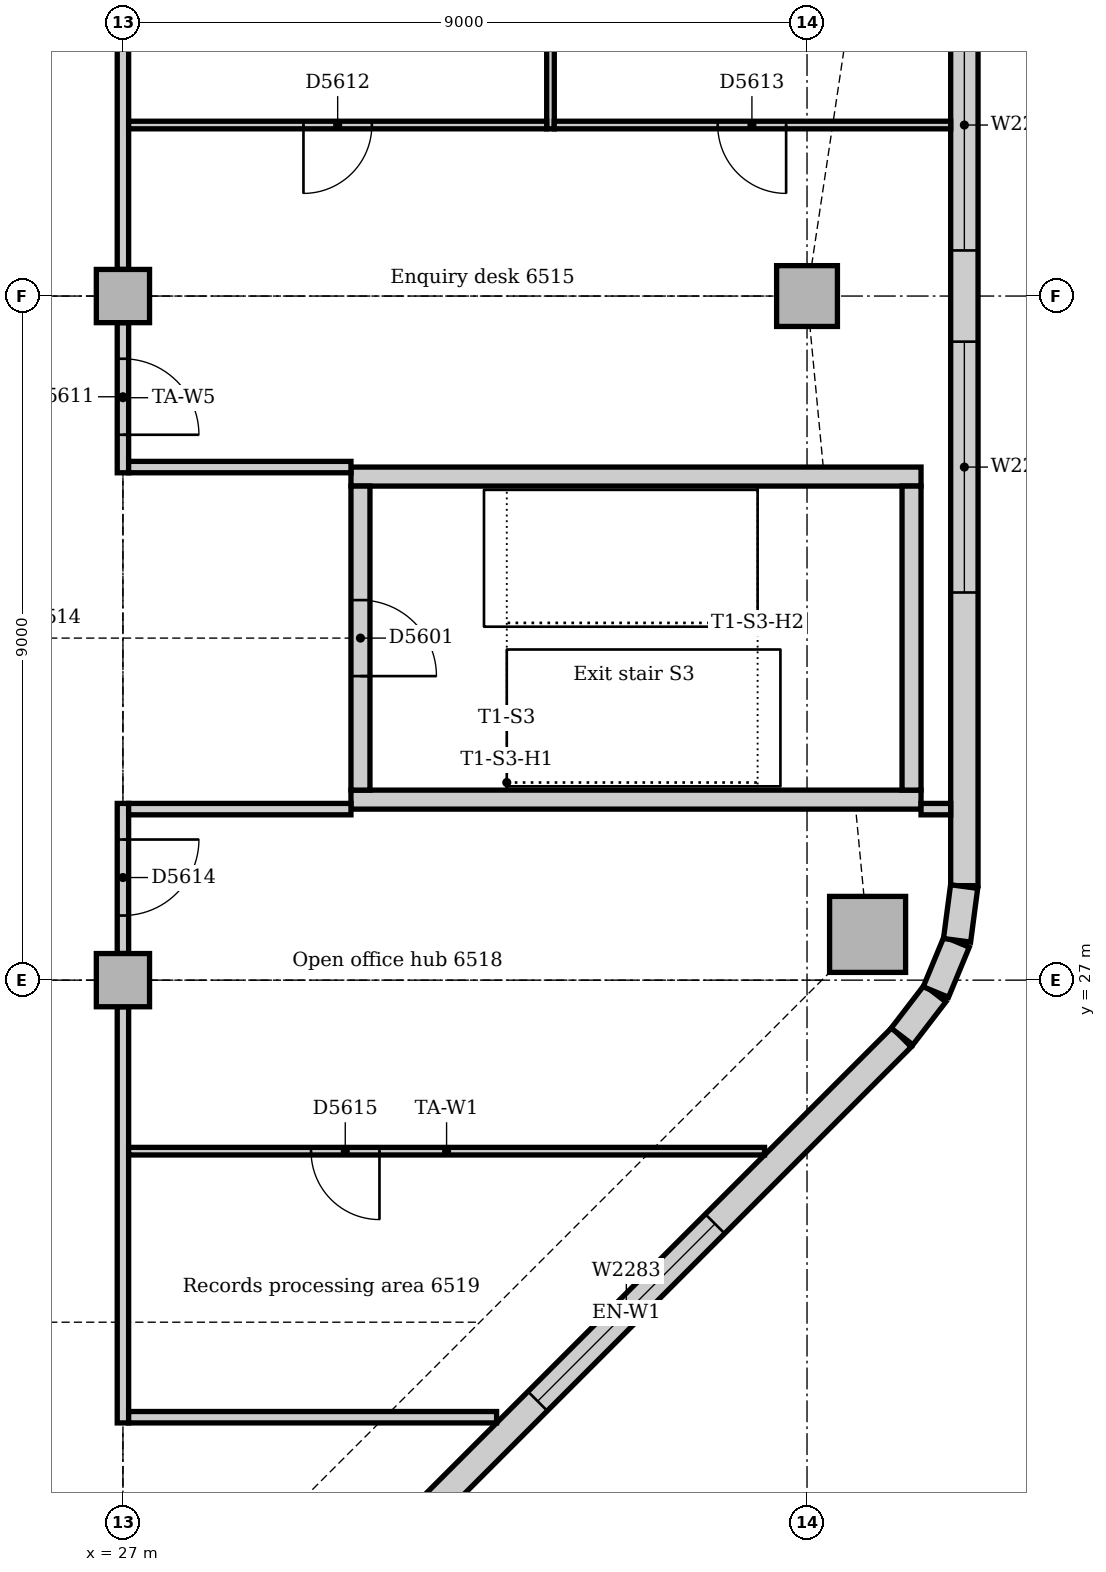
"""IFC4 building model, lengths in metres.
Left out: names, types, materials, properties, quantities, classifications, styles, units other than length and angle.
Written with IfcOpenShell. Run it as: python <this file> out.ifc"""

import sys

from ifc_helpers import new_model, si_unit, direction, frame, frame_2d, origin, origin_2d, place, context, subcontext, project, spatial, rectangle, extrude, element, fill, save


model = new_model("IFC4")
c1 = context("Model", 3, precision=1e-05, world=origin(), true_north=direction((0.0, 1.0)))
c2 = subcontext(c1, "Body", "Model", "MODEL_VIEW")
j1 = project(units=[si_unit("LENGTHUNIT", "METRE"), si_unit("PLANEANGLEUNIT", "RADIAN")], contexts=[c1])
p1 = place(None, origin())
s1 = spatial("IfcSite", under=j1, at=p1, CompositionType="ELEMENT")
p2 = place(p1, origin())
s2 = spatial("IfcBuilding", under=s1, at=p2, CompositionType="ELEMENT")
p3 = place(p2, frame((0.0, 0.0, 271.0)))
s3 = spatial("IfcBuildingStorey", under=s2, at=p3, CompositionType="ELEMENT", Elevation=271.0)
for number, where, z_axis, x_axis in (
    (1, (30.0, 29.375, 0.0), (0.0, 0.0, 1.0), (1.0, 0.0, 0.0)),
    (2, (37.5, 33.625, 0.0), (0.0, 0.0, 1.0), (-1.0, 0.0, 0.0)),
):
    element("IfcWall", number, at=place(p3, frame(where, z_axis=z_axis, x_axis=x_axis)), inside=s3, PredefinedType="SOLIDWALL", context=c2, shape_type="SweptSolid", body=[
        extrude(rectangle(XDim=7.5, YDim=0.25, at=frame_2d((3.75, 0.0))), origin(), (0.0, 0.0, 1.0), 4.0),
    ])
p4 = place(p3, frame((37.375, 29.5, 0.0), z_axis=(0.0, 0.0, 1.0), x_axis=(0.0, 1.0, 0.0)))
e3 = element("IfcWall", 3, at=p4, inside=s3, PredefinedType="SOLIDWALL", context=c2, shape_type="SweptSolid", body=[
    extrude(rectangle(XDim=4.0, YDim=0.25, at=frame_2d((2.0, 0.0))), origin(), (0.0, 0.0, 1.0), 4.0),
])
p5 = place(p3, frame((30.125, 33.5, 0.0), z_axis=(0.0, 0.0, 1.0), x_axis=(0.0, -1.0, 0.0)))
e4 = element("IfcWall", 4, at=p5, inside=s3, PredefinedType="SOLIDWALL", context=c2, shape_type="SweptSolid", body=[
    extrude(rectangle(XDim=4.0, YDim=0.25, at=frame_2d((2.0, 0.0))), origin(), (0.0, 0.0, 1.0), 4.0),
])
p6 = place(p5, frame((1.5, 0.0, 0.0)))
e5 = element("IfcOpeningElement", 5, at=p6, cuts=e4, PredefinedType="OPENING", context=c2, shape_type="SweptSolid", body=[
    extrude(rectangle(XDim=1.0, YDim=2.1, at=frame_2d((0.5, 1.05))), frame((0.0, 0.135, 0.0), z_axis=(0.0, -1.0, 0.0), x_axis=(1.0, 0.0, 0.0)), (0.0, 0.0, 1.0), 0.27),
])
p7 = place(p3, frame((36.797, 27.602, 0.0), z_axis=(0.0, 0.0, 1.0), x_axis=(1.0, 0.0, 0.0)))
e6 = element("IfcColumn", 6, at=p7, inside=s3, PredefinedType="COLUMN", context=c2, shape_type="SweptSolid", body=[
    extrude(rectangle(XDim=1.0, YDim=1.0, at=origin_2d()), origin(), (0.0, 0.0, 1.0), 3.85),
])
p8 = place(p3, frame((36.0, 36.0, 0.0), z_axis=(0.0, 0.0, 1.0), x_axis=(1.0, 0.0, 0.0)))
e7 = element("IfcColumn", 7, at=p8, inside=s3, PredefinedType="COLUMN", context=c2, shape_type="SweptSolid", body=[
    extrude(rectangle(XDim=0.8, YDim=0.8, at=origin_2d()), origin(), (0.0, 0.0, 1.0), 3.85),
])
for number, where, z_axis, x_axis in (
    (8, (27.0, 27.0, 0.0), (0.0, 0.0, 1.0), (1.0, 0.0, 0.0)),
    (9, (27.0, 36.0, 0.0), (0.0, 0.0, 1.0), (1.0, 0.0, 0.0)),
):
    element("IfcColumn", number, at=place(p3, frame(where, z_axis=z_axis, x_axis=x_axis)), inside=s3, PredefinedType="COLUMN", context=c2, shape_type="SweptSolid", body=[
        extrude(rectangle(XDim=0.7, YDim=0.7, at=origin_2d()), origin(), (0.0, 0.0, 1.0), 3.85),
    ])
p9 = place(p3, frame((30.001, 19.006, 0.0), z_axis=(0.0, 0.0, 1.0), x_axis=(0.707106781187, 0.707106781187, 0.0)))
e10 = element("IfcWall", 10, at=p9, inside=s3, PredefinedType="STANDARD", context=c2, shape_type="SweptSolid", body=[
    extrude(rectangle(XDim=10.243, YDim=0.36, at=frame_2d((5.121, 0.0))), origin(), (0.0, 0.0, 1.0), 3.85),
])
p10 = place(p9, frame((3.471, 0.0, 0.9)))
e11 = element("IfcOpeningElement", 11, at=p10, cuts=e10, PredefinedType="OPENING", context=c2, shape_type="SweptSolid", body=[
    extrude(rectangle(XDim=3.3, YDim=1.6, at=frame_2d((1.65, 0.8))), frame((0.0, 0.19, 0.0), z_axis=(0.0, -1.0, 0.0), x_axis=(1.0, 0.0, 0.0)), (0.0, 0.0, 1.0), 0.38),
])
p11 = place(p3, frame((38.07, 28.243, 0.0), z_axis=(0.0, 0.0, 1.0), x_axis=(0.0, 1.0, 0.0)))
e12 = element("IfcWall", 12, at=p11, inside=s3, PredefinedType="STANDARD", context=c2, shape_type="SweptSolid", body=[
    extrude(rectangle(XDim=24.515, YDim=0.36, at=frame_2d((12.257, 0.0))), origin(), (0.0, 0.0, 1.0), 3.85),
])
p12 = place(p11, frame((3.857, 0.0, 0.9)))
e13 = element("IfcOpeningElement", 13, at=p12, cuts=e12, PredefinedType="OPENING", context=c2, shape_type="SweptSolid", body=[
    extrude(rectangle(XDim=3.3, YDim=1.6, at=frame_2d((1.65, 0.8))), frame((0.0, 0.19, 0.0), z_axis=(0.0, -1.0, 0.0), x_axis=(1.0, 0.0, 0.0)), (0.0, 0.0, 1.0), 0.38),
])
p13 = place(p11, frame((8.357, 0.0, 0.9)))
e14 = element("IfcOpeningElement", 14, at=p13, cuts=e12, PredefinedType="OPENING", context=c2, shape_type="SweptSolid", body=[
    extrude(rectangle(XDim=3.3, YDim=1.6, at=frame_2d((1.65, 0.8))), frame((0.0, 0.19, 0.0), z_axis=(0.0, -1.0, 0.0), x_axis=(1.0, 0.0, 0.0)), (0.0, 0.0, 1.0), 0.38),
])
p14 = place(p11, frame((12.857, 0.0, 0.9)))
e15 = element("IfcOpeningElement", 15, at=p14, cuts=e12, PredefinedType="OPENING", context=c2, shape_type="SweptSolid", body=[
    extrude(rectangle(XDim=3.3, YDim=1.6, at=frame_2d((1.65, 0.8))), frame((0.0, 0.19, 0.0), z_axis=(0.0, -1.0, 0.0), x_axis=(1.0, 0.0, 0.0)), (0.0, 0.0, 1.0), 0.38),
])
p15 = place(p11, frame((17.357, 0.0, 0.9)))
e16 = element("IfcOpeningElement", 16, at=p15, cuts=e12, PredefinedType="OPENING", context=c2, shape_type="SweptSolid", body=[
    extrude(rectangle(XDim=3.3, YDim=1.6, at=frame_2d((1.65, 0.8))), frame((0.0, 0.19, 0.0), z_axis=(0.0, -1.0, 0.0), x_axis=(1.0, 0.0, 0.0)), (0.0, 0.0, 1.0), 0.38),
])
p16 = place(p3, frame((37.25, 26.259, 0.0), z_axis=(0.0, 0.0, 1.0), x_axis=(0.608802368033, 0.793321924995, 0.0)))
e17 = element("IfcWall", 17, at=p16, inside=s3, PredefinedType="STANDARD", context=c2, shape_type="SweptSolid", body=[
    extrude(rectangle(XDim=0.713, YDim=0.36, at=frame_2d((0.357, 0.0))), origin(), (0.0, 0.0, 1.0), 3.85),
])
for number, where, z_axis, x_axis in (
    (18, (37.695, 26.844, 0.0), (0.0, 0.0, 1.0), (0.383, 0.924, 0.0)),
    (19, (37.974, 27.524, 0.0), (0.0, 0.0, 1.0), (0.131, 0.991, 0.0)),
):
    element("IfcWall", number, at=place(p3, frame(where, z_axis=z_axis, x_axis=x_axis)), inside=s3, PredefinedType="STANDARD", context=c2, shape_type="SweptSolid", body=[
        extrude(rectangle(XDim=0.713, YDim=0.36, at=frame_2d((0.356, 0.0))), origin(), (0.0, 0.0, 1.0), 3.85),
    ])
p17 = place(p3, frame((27.0, 33.675, 0.0), z_axis=(0.0, 0.0, 1.0), x_axis=(0.0, 1.0, 0.0)))
e20 = element("IfcWall", 20, at=p17, inside=s3, PredefinedType="PARTITIONING", context=c2, shape_type="SweptSolid", body=[
    extrude(rectangle(XDim=1.975, YDim=0.15, at=frame_2d((0.988, 0.0))), origin(), (0.0, 0.0, 1.0), 3.4),
])
p18 = place(p17, frame((0.5, 0.0, 0.0)))
e21 = element("IfcOpeningElement", 21, at=p18, cuts=e20, PredefinedType="OPENING", context=c2, shape_type="SweptSolid", body=[
    extrude(rectangle(XDim=1.0, YDim=2.1, at=frame_2d((0.5, 1.05))), frame((0.0, 0.085, 0.0), z_axis=(0.0, -1.0, 0.0), x_axis=(1.0, 0.0, 0.0)), (0.0, 0.0, 1.0), 0.17),
])
p19 = place(p3, frame((27.0, 36.35, 0.0), z_axis=(0.0, 0.0, 1.0), x_axis=(0.0, 1.0, 0.0)))
e22 = element("IfcWall", 22, at=p19, inside=s3, PredefinedType="PARTITIONING", context=c2, shape_type="SweptSolid", body=[
    extrude(rectangle(XDim=7.4, YDim=0.15, at=frame_2d((3.7, 0.0))), origin(), (0.0, 0.0, 1.0), 3.4),
])
p20 = place(p3, frame((27.0, 21.175, 0.0), z_axis=(0.0, 0.0, 1.0), x_axis=(0.0, 1.0, 0.0)))
e23 = element("IfcWall", 23, at=p20, inside=s3, PredefinedType="PARTITIONING", context=c2, shape_type="SweptSolid", body=[
    extrude(rectangle(XDim=5.475, YDim=0.15, at=frame_2d((2.737, 0.0))), origin(), (0.0, 0.0, 1.0), 3.4),
])
p21 = place(p3, frame((27.0, 27.35, 0.0), z_axis=(0.0, 0.0, 1.0), x_axis=(0.0, 1.0, 0.0)))
e24 = element("IfcWall", 24, at=p21, inside=s3, PredefinedType="PARTITIONING", context=c2, shape_type="SweptSolid", body=[
    extrude(rectangle(XDim=1.975, YDim=0.15, at=frame_2d((0.988, 0.0))), origin(), (0.0, 0.0, 1.0), 3.4),
])
p22 = place(p21, frame((0.5, 0.0, 0.0)))
e25 = element("IfcOpeningElement", 25, at=p22, cuts=e24, PredefinedType="OPENING", context=c2, shape_type="SweptSolid", body=[
    extrude(rectangle(XDim=1.0, YDim=2.1, at=frame_2d((0.5, 1.05))), frame((0.0, 0.085, 0.0), z_axis=(0.0, -1.0, 0.0), x_axis=(1.0, 0.0, 0.0)), (0.0, 0.0, 1.0), 0.17),
])
p23 = place(p3, frame((27.075, 21.25, 0.0), z_axis=(0.0, 0.0, 1.0), x_axis=(1.0, 0.0, 0.0)))
e26 = element("IfcWall", 26, at=p23, inside=s3, PredefinedType="PARTITIONING", context=c2, shape_type="SweptSolid", body=[
    extrude(rectangle(XDim=4.841, YDim=0.15, at=frame_2d((2.421, 0.0))), origin(), (0.0, 0.0, 1.0), 3.85),
])
for number, where, z_axis, x_axis in (
    (27, (27.075, 29.25, 0.0), (0.0, 0.0, 1.0), (1.0, 0.0, 0.0)),
    (28, (27.075, 33.75, 0.0), (0.0, 0.0, 1.0), (1.0, 0.0, 0.0)),
):
    element("IfcWall", number, at=place(p3, frame(where, z_axis=z_axis, x_axis=x_axis)), inside=s3, PredefinedType="PARTITIONING", context=c2, shape_type="SweptSolid", body=[
        extrude(rectangle(XDim=2.925, YDim=0.15, at=frame_2d((1.462, 0.0))), origin(), (0.0, 0.0, 1.0), 3.85),
    ])
p24 = place(p3, frame((37.5, 29.25, 0.0), z_axis=(0.0, 0.0, 1.0), x_axis=(1.0, 0.0, 0.0)))
e29 = element("IfcWall", 29, at=p24, inside=s3, PredefinedType="PARTITIONING", context=c2, shape_type="SweptSolid", body=[
    extrude(rectangle(XDim=0.39, YDim=0.15, at=frame_2d((0.195, 0.0))), origin(), (0.0, 0.0, 1.0), 3.85),
])
p25 = place(p3, frame((32.625, 38.2, 0.0), z_axis=(0.0, 0.0, 1.0), x_axis=(0.0, 1.0, 0.0)))
e30 = element("IfcWall", 30, at=p25, inside=s3, PredefinedType="PARTITIONING", context=c2, shape_type="SweptSolid", body=[
    extrude(rectangle(XDim=20.966, YDim=0.1, at=frame_2d((10.483, 0.0))), origin(), (0.0, 0.0, 1.0), 3.85),
])
p26 = place(p3, frame((27.075, 38.25, 0.0), z_axis=(0.0, 0.0, 1.0), x_axis=(1.0, 0.0, 0.0)))
e31 = element("IfcWall", 31, at=p26, inside=s3, PredefinedType="PARTITIONING", context=c2, shape_type="SweptSolid", body=[
    extrude(rectangle(XDim=5.5, YDim=0.1, at=frame_2d((2.75, 0.0))), origin(), (0.0, 0.0, 1.0), 3.85),
])
p27 = place(p26, frame((2.3, 0.0, 0.0)))
e32 = element("IfcOpeningElement", 32, at=p27, cuts=e31, PredefinedType="OPENING", context=c2, shape_type="SweptSolid", body=[
    extrude(rectangle(XDim=0.9, YDim=2.1, at=frame_2d((0.45, 1.05))), frame((0.0, 0.06, 0.0), z_axis=(0.0, -1.0, 0.0), x_axis=(1.0, 0.0, 0.0)), (0.0, 0.0, 1.0), 0.12),
])
p28 = place(p3, frame((32.675, 38.25, 0.0), z_axis=(0.0, 0.0, 1.0), x_axis=(1.0, 0.0, 0.0)))
e33 = element("IfcWall", 33, at=p28, inside=s3, PredefinedType="PARTITIONING", context=c2, shape_type="SweptSolid", body=[
    extrude(rectangle(XDim=5.215, YDim=0.1, at=frame_2d((2.607, 0.0))), origin(), (0.0, 0.0, 1.0), 3.85),
])
p29 = place(p28, frame((2.15, 0.0, 0.0)))
e34 = element("IfcOpeningElement", 34, at=p29, cuts=e33, PredefinedType="OPENING", context=c2, shape_type="SweptSolid", body=[
    extrude(rectangle(XDim=0.9, YDim=2.1, at=frame_2d((0.45, 1.05))), frame((0.0, 0.06, 0.0), z_axis=(0.0, -1.0, 0.0), x_axis=(1.0, 0.0, 0.0)), (0.0, 0.0, 1.0), 0.12),
])
p30 = place(p3, frame((27.075, 24.75, 0.0), z_axis=(0.0, 0.0, 1.0), x_axis=(1.0, 0.0, 0.0)))
e35 = element("IfcWall", 35, at=p30, inside=s3, PredefinedType="PARTITIONING", context=c2, shape_type="SweptSolid", body=[
    extrude(rectangle(XDim=8.366, YDim=0.1, at=frame_2d((4.183, 0.0))), origin(), (0.0, 0.0, 1.0), 3.85),
])
p31 = place(p30, frame((2.4, 0.0, 0.0)))
e36 = element("IfcOpeningElement", 36, at=p31, cuts=e35, PredefinedType="OPENING", context=c2, shape_type="SweptSolid", body=[
    extrude(rectangle(XDim=0.9, YDim=2.1, at=frame_2d((0.45, 1.05))), frame((0.0, 0.06, 0.0), z_axis=(0.0, -1.0, 0.0), x_axis=(1.0, 0.0, 0.0)), (0.0, 0.0, 1.0), 0.12),
])
p32 = place(p10, origin())
e37 = element("IfcWindow", 37, at=p32, inside=s3, PartitioningType="SINGLE_PANEL", PredefinedType="WINDOW", context=c2, shape_type="SweptSolid", body=[
    extrude(rectangle(XDim=3.3, YDim=1.6, at=frame_2d((1.65, 0.8))), frame((0.0, 0.13, 0.0), z_axis=(0.0, -1.0, 0.0), x_axis=(1.0, 0.0, 0.0)), (0.0, 0.0, 1.0), 0.06),
])
fill(e11, e37)
p33 = place(p12, origin())
e38 = element("IfcWindow", 38, at=p33, inside=s3, PartitioningType="SINGLE_PANEL", PredefinedType="WINDOW", context=c2, shape_type="SweptSolid", body=[
    extrude(rectangle(XDim=3.3, YDim=1.6, at=frame_2d((1.65, 0.8))), frame((0.0, 0.13, 0.0), z_axis=(0.0, -1.0, 0.0), x_axis=(1.0, 0.0, 0.0)), (0.0, 0.0, 1.0), 0.06),
])
fill(e13, e38)
p34 = place(p13, origin())
e39 = element("IfcWindow", 39, at=p34, inside=s3, PartitioningType="SINGLE_PANEL", PredefinedType="WINDOW", context=c2, shape_type="SweptSolid", body=[
    extrude(rectangle(XDim=3.3, YDim=1.6, at=frame_2d((1.65, 0.8))), frame((0.0, 0.13, 0.0), z_axis=(0.0, -1.0, 0.0), x_axis=(1.0, 0.0, 0.0)), (0.0, 0.0, 1.0), 0.06),
])
fill(e14, e39)
p35 = place(p6, origin())
e40 = element("IfcDoor", 40, at=p35, inside=s3, OperationType="SINGLE_SWING_RIGHT", PredefinedType="DOOR", context=c2, shape_type="SweptSolid", body=[
    extrude(rectangle(XDim=1.0, YDim=2.1, at=frame_2d((0.5, 1.05))), frame((0.0, 0.025, 0.0), z_axis=(0.0, -1.0, 0.0), x_axis=(1.0, 0.0, 0.0)), (0.0, 0.0, 1.0), 0.05),
])
fill(e5, e40)
p36 = place(p18, frame((1.0, 0.0, 0.0), z_axis=(0.0, 0.0, 1.0), x_axis=(-1.0, 0.0, 0.0)))
e41 = element("IfcDoor", 41, at=p36, inside=s3, OperationType="SINGLE_SWING_RIGHT", PredefinedType="DOOR", context=c2, shape_type="SweptSolid", body=[
    extrude(rectangle(XDim=1.0, YDim=2.1, at=frame_2d((0.5, 1.05))), frame((0.0, 0.025, 0.0), z_axis=(0.0, -1.0, 0.0), x_axis=(1.0, 0.0, 0.0)), (0.0, 0.0, 1.0), 0.05),
])
fill(e21, e41)
p37 = place(p27, frame((0.9, 0.0, 0.0), z_axis=(0.0, 0.0, 1.0), x_axis=(-1.0, 0.0, 0.0)))
e42 = element("IfcDoor", 42, at=p37, inside=s3, OperationType="SINGLE_SWING_RIGHT", PredefinedType="DOOR", context=c2, shape_type="SweptSolid", body=[
    extrude(rectangle(XDim=0.9, YDim=2.1, at=frame_2d((0.45, 1.05))), frame((0.0, 0.025, 0.0), z_axis=(0.0, -1.0, 0.0), x_axis=(1.0, 0.0, 0.0)), (0.0, 0.0, 1.0), 0.05),
])
fill(e32, e42)
p38 = place(p29, frame((0.9, 0.0, 0.0), z_axis=(0.0, 0.0, 1.0), x_axis=(-1.0, 0.0, 0.0)))
e43 = element("IfcDoor", 43, at=p38, inside=s3, OperationType="SINGLE_SWING_LEFT", PredefinedType="DOOR", context=c2, shape_type="SweptSolid", body=[
    extrude(rectangle(XDim=0.9, YDim=2.1, at=frame_2d((0.45, 1.05))), frame((0.0, 0.025, 0.0), z_axis=(0.0, -1.0, 0.0), x_axis=(1.0, 0.0, 0.0)), (0.0, 0.0, 1.0), 0.05),
])
fill(e34, e43)
p39 = place(p22, frame((1.0, 0.0, 0.0), z_axis=(0.0, 0.0, 1.0), x_axis=(-1.0, 0.0, 0.0)))
e44 = element("IfcDoor", 44, at=p39, inside=s3, OperationType="SINGLE_SWING_LEFT", PredefinedType="DOOR", context=c2, shape_type="SweptSolid", body=[
    extrude(rectangle(XDim=1.0, YDim=2.1, at=frame_2d((0.5, 1.05))), frame((0.0, 0.025, 0.0), z_axis=(0.0, -1.0, 0.0), x_axis=(1.0, 0.0, 0.0)), (0.0, 0.0, 1.0), 0.05),
])
fill(e25, e44)
p40 = place(p31, frame((0.9, 0.0, 0.0), z_axis=(0.0, 0.0, 1.0), x_axis=(-1.0, 0.0, 0.0)))
e45 = element("IfcDoor", 45, at=p40, inside=s3, OperationType="SINGLE_SWING_LEFT", PredefinedType="DOOR", context=c2, shape_type="SweptSolid", body=[
    extrude(rectangle(XDim=0.9, YDim=2.1, at=frame_2d((0.45, 1.05))), frame((0.0, 0.025, 0.0), z_axis=(0.0, -1.0, 0.0), x_axis=(1.0, 0.0, 0.0)), (0.0, 0.0, 1.0), 0.05),
])
fill(e36, e45)
save(model, sys.argv[1])
